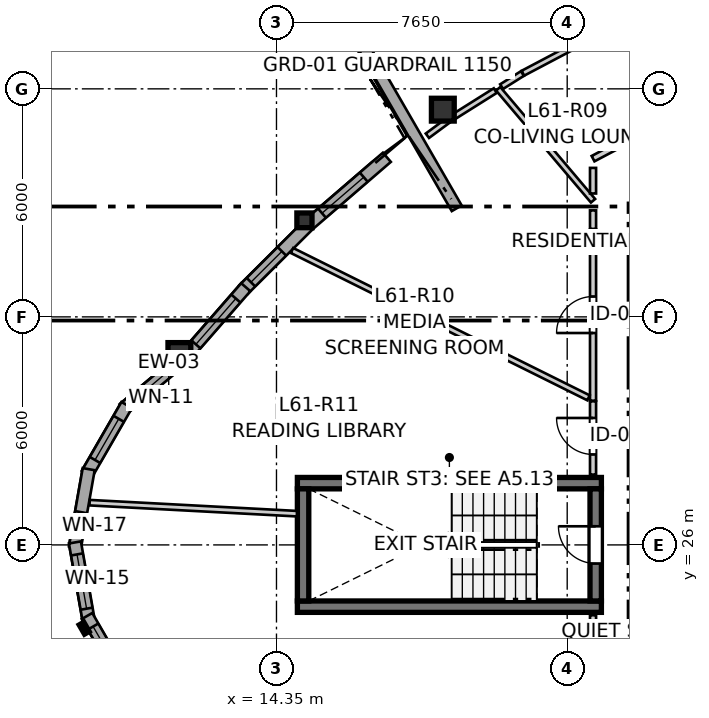
"""IFC4 building model, lengths in metres.
Left out: names, types, materials, properties, quantities, classifications, styles, units other than length and angle.
Written with IfcOpenShell. Run it as: python <this file> out.ifc"""

import sys

from ifc_helpers import new_model, si_unit, direction, frame, frame_2d, origin, origin_2d, place, context, subcontext, project, spatial, rectangle, i_section, extrude, source, transform, mapped, element, fill, save


model = new_model("IFC4")
c1 = context("Model", 3, precision=1e-05, world=origin(), true_north=direction((0.0, 1.0)))
c2 = subcontext(c1, "Body", "Model", "MODEL_VIEW")
j1 = project(units=[si_unit("LENGTHUNIT", "METRE"), si_unit("PLANEANGLEUNIT", "RADIAN")], contexts=[c1])
p1 = place(None, origin())
s1 = spatial("IfcSite", under=j1, at=p1, CompositionType="ELEMENT")
p2 = place(p1, origin())
s2 = spatial("IfcBuilding", under=s1, at=p2, CompositionType="ELEMENT")
p3 = place(p2, frame((0.0, 0.0, 205.2)))
s3 = spatial("IfcBuildingStorey", under=s2, at=p3, CompositionType="ELEMENT", Elevation=205.2)
for number, where, z_axis, x_axis in (
    (1, (14.9, 24.375, 0.0), (0.0, 0.0, 1.0), (1.0, 0.0, 0.0)),
    (2, (22.9, 27.625, 0.0), (0.0, 0.0, 1.0), (-1.0, 0.0, 0.0)),
):
    element("IfcWall", number, at=place(p3, frame(where, z_axis=z_axis, x_axis=x_axis)), inside=s3, PredefinedType="SHEAR", context=c2, shape_type="SweptSolid", body=[
        extrude(rectangle(XDim=8.0, YDim=0.3, at=frame_2d((4.0, 0.0))), origin(), (0.0, 0.0, 1.0), 2.935),
    ])
p4 = place(p3, frame((15.05, 27.475, 0.0), z_axis=(0.0, 0.0, 1.0), x_axis=(0.0, -1.0, 0.0)))
e3 = element("IfcWall", 3, at=p4, inside=s3, PredefinedType="SHEAR", context=c2, shape_type="SweptSolid", body=[
    extrude(rectangle(XDim=2.95, YDim=0.3, at=frame_2d((1.475, 0.0))), origin(), (0.0, 0.0, 1.0), 2.935),
])
p5 = place(p3, frame((22.75, 24.525, 0.0), z_axis=(0.0, 0.0, 1.0), x_axis=(0.0, 1.0, 0.0)))
e4 = element("IfcWall", 4, at=p5, inside=s3, PredefinedType="SHEAR", context=c2, shape_type="SweptSolid", body=[
    extrude(rectangle(XDim=2.95, YDim=0.3, at=frame_2d((1.475, 0.0))), origin(), (0.0, 0.0, 1.0), 2.935),
])
p6 = place(p5, frame((0.985, 0.0, 0.0)))
e5 = element("IfcOpeningElement", 5, at=p6, cuts=e4, PredefinedType="OPENING", context=c2, shape_type="SweptSolid", body=[
    extrude(rectangle(XDim=0.98, YDim=2.15, at=frame_2d((0.49, 1.075))), frame((0.0, 0.16, 0.0), z_axis=(0.0, -1.0, 0.0), x_axis=(1.0, 0.0, 0.0)), (0.0, 0.0, 1.0), 0.32),
])
m1 = source(origin(), c2, "Body", "SweptSolid", [
    extrude(rectangle(XDim=0.6, YDim=0.6, at=origin_2d()), origin(), (0.0, 0.0, 1.0), 2.935),
])
for number, where, z_axis, x_axis in (
    (6, (11.795, 31.023, 0.0), (0.0, 0.0, 1.0), (1.0, 0.0, 0.0)),
    (7, (18.727, 37.452, 0.0), (0.0, 0.0, 1.0), (1.0, 0.0, 0.0)),
):
    element("IfcColumn", number, at=place(p3, frame(where, z_axis=z_axis, x_axis=x_axis)), inside=s3, PredefinedType="COLUMN", context=c2, shape_type="MappedRepresentation", body=[
        mapped(m1, transform((0.0, 0.0, 0.0), x_axis=(1.0, 0.0, 0.0), y_axis=(0.0, 1.0, 0.0), z_axis=(0.0, 0.0, 1.0), scale=1.0)),
    ])
m2 = source(origin(), c2, "Body", "SweptSolid", [
    extrude(i_section(OverallWidth=0.398, OverallDepth=0.387, WebThickness=0.019, FlangeThickness=0.03, FilletRadius=0.015, at=origin_2d()), origin(), (0.0, 0.0, 1.0), 2.935),
])
p7 = place(p3, frame((15.086, 34.541, 0.0), z_axis=(0.0, 0.0, 1.0), x_axis=(1.0, 0.0, 0.0)))
e8 = element("IfcColumn", 8, at=p7, inside=s3, PredefinedType="PILASTER", context=c2, shape_type="MappedRepresentation", body=[
    mapped(m2, transform((0.0, 0.0, 0.0), x_axis=(1.0, 0.0, 0.0), y_axis=(0.0, 1.0, 0.0), z_axis=(0.0, 0.0, 1.0), scale=1.0)),
])
p8 = place(p3, frame((11.829, 30.843, 0.0), z_axis=(0.0, 0.0, 1.0), x_axis=(-0.76606505432, -0.642763045414, 0.0)))
e9 = element("IfcWall", 9, at=p8, inside=s3, PredefinedType="SOLIDWALL", context=c2, shape_type="SweptSolid", body=[
    extrude(rectangle(XDim=1.962, YDim=0.32, at=frame_2d((0.981, 0.0))), origin(), (0.0, 0.0, 1.0), 2.555),
])
p9 = place(p8, frame((0.391, 0.0, 0.82)))
e10 = element("IfcOpeningElement", 10, at=p9, cuts=e9, PredefinedType="OPENING", context=c2, shape_type="SweptSolid", body=[
    extrude(rectangle(XDim=1.25, YDim=1.35, at=frame_2d((0.625, 0.675))), frame((0.0, 0.17, 0.0), z_axis=(0.0, -1.0, 0.0), x_axis=(1.0, 0.0, 0.0)), (0.0, 0.0, 1.0), 0.34),
])
p10 = place(p3, frame((10.409, 29.681, 0.0), z_axis=(0.0, 0.0, 1.0), x_axis=(-0.49990781971, -0.866078617559, 0.0)))
e11 = element("IfcWall", 11, at=p10, inside=s3, PredefinedType="SOLIDWALL", context=c2, shape_type="SweptSolid", body=[
    extrude(rectangle(XDim=2.09, YDim=0.32, at=frame_2d((1.045, 0.0))), origin(), (0.0, 0.0, 1.0), 2.555),
])
p11 = place(p10, frame((0.42, 0.0, 0.82)))
e12 = element("IfcOpeningElement", 12, at=p11, cuts=e11, PredefinedType="OPENING", context=c2, shape_type="SweptSolid", body=[
    extrude(rectangle(XDim=1.25, YDim=1.35, at=frame_2d((0.625, 0.675))), frame((0.0, 0.17, 0.0), z_axis=(0.0, -1.0, 0.0), x_axis=(1.0, 0.0, 0.0)), (0.0, 0.0, 1.0), 0.34),
])
p12 = place(p3, frame((9.409, 27.993, 0.0), z_axis=(0.0, 0.0, 1.0), x_axis=(-0.173672066494, -0.984803540469, 0.0)))
e13 = element("IfcWall", 13, at=p12, inside=s3, PredefinedType="SOLIDWALL", context=c2, shape_type="SweptSolid", body=[
    extrude(rectangle(XDim=2.09, YDim=0.32, at=frame_2d((1.045, 0.0))), origin(), (0.0, 0.0, 1.0), 2.555),
])
p13 = place(p12, frame((1.149, 0.0, 0.82)))
e14 = element("IfcOpeningElement", 14, at=p13, cuts=e13, PredefinedType="OPENING", context=c2, shape_type="SweptSolid", body=[
    extrude(rectangle(XDim=0.58, YDim=1.35, at=frame_2d((0.29, 0.675))), frame((0.0, 0.17, 0.0), z_axis=(0.0, -1.0, 0.0), x_axis=(1.0, 0.0, 0.0)), (0.0, 0.0, 1.0), 0.34),
])
p14 = place(p3, frame((9.046, 26.065, 0.0), z_axis=(0.0, 0.0, 1.0), x_axis=(0.173672066494, -0.984803540469, 0.0)))
e15 = element("IfcWall", 15, at=p14, inside=s3, PredefinedType="SOLIDWALL", context=c2, shape_type="SweptSolid", body=[
    extrude(rectangle(XDim=2.09, YDim=0.32, at=frame_2d((1.045, 0.0))), origin(), (0.0, 0.0, 1.0), 2.555),
])
p15 = place(p14, frame((0.32, 0.0, 0.82)))
e16 = element("IfcOpeningElement", 16, at=p15, cuts=e15, PredefinedType="OPENING", context=c2, shape_type="SweptSolid", body=[
    extrude(rectangle(XDim=1.45, YDim=1.25, at=frame_2d((0.725, 0.625))), frame((0.0, 0.17, 0.0), z_axis=(0.0, -1.0, 0.0), x_axis=(1.0, 0.0, 0.0)), (0.0, 0.0, 1.0), 0.34),
])
p16 = place(p3, frame((9.365, 24.129, 0.0), z_axis=(0.0, 0.0, 1.0), x_axis=(0.49990781971, -0.866078617559, 0.0)))
e17 = element("IfcWall", 17, at=p16, inside=s3, PredefinedType="SOLIDWALL", context=c2, shape_type="SweptSolid", body=[
    extrude(rectangle(XDim=2.09, YDim=0.32, at=frame_2d((1.045, 0.0))), origin(), (0.0, 0.0, 1.0), 2.555),
])
p17 = place(p16, frame((0.32, 0.0, 0.82)))
e18 = element("IfcOpeningElement", 18, at=p17, cuts=e17, PredefinedType="OPENING", context=c2, shape_type="SweptSolid", body=[
    extrude(rectangle(XDim=1.45, YDim=1.25, at=frame_2d((0.725, 0.625))), frame((0.0, 0.17, 0.0), z_axis=(0.0, -1.0, 0.0), x_axis=(1.0, 0.0, 0.0)), (0.0, 0.0, 1.0), 0.34),
])
p18 = place(p3, frame((17.255, 36.199, 0.0), z_axis=(0.0, 0.0, 1.0), x_axis=(-0.757502279287, -0.652832518242, 0.0)))
e19 = element("IfcWall", 19, at=p18, inside=s3, PredefinedType="SOLIDWALL", context=c2, shape_type="SweptSolid", body=[
    extrude(rectangle(XDim=2.706, YDim=0.32, at=frame_2d((1.353, 0.0))), origin(), (0.0, 0.0, 1.0), 2.555),
])
p19 = place(p18, frame((0.803, 0.0, 0.82)))
e20 = element("IfcOpeningElement", 20, at=p19, cuts=e19, PredefinedType="OPENING", context=c2, shape_type="SweptSolid", body=[
    extrude(rectangle(XDim=1.45, YDim=1.25, at=frame_2d((0.725, 0.625))), frame((0.0, 0.17, 0.0), z_axis=(0.0, -1.0, 0.0), x_axis=(1.0, 0.0, 0.0)), (0.0, 0.0, 1.0), 0.34),
])
p20 = place(p3, frame((15.185, 34.413, 0.0), z_axis=(0.0, 0.0, 1.0), x_axis=(-0.70842648029, -0.705784614471, 0.0)))
e21 = element("IfcWall", 21, at=p20, inside=s3, PredefinedType="SOLIDWALL", context=c2, shape_type="SweptSolid", body=[
    extrude(rectangle(XDim=2.403, YDim=0.32, at=frame_2d((1.201, 0.0))), origin(), (0.0, 0.0, 1.0), 2.555),
])
p21 = place(p20, frame((0.976, 0.0, 0.82)))
e22 = element("IfcOpeningElement", 22, at=p21, cuts=e21, PredefinedType="OPENING", context=c2, shape_type="SweptSolid", body=[
    extrude(rectangle(XDim=1.15, YDim=1.2, at=frame_2d((0.575, 0.6))), frame((0.0, 0.17, 0.0), z_axis=(0.0, -1.0, 0.0), x_axis=(1.0, 0.0, 0.0)), (0.0, 0.0, 1.0), 0.34),
])
p22 = place(p3, frame((13.542, 32.781, 0.0), z_axis=(0.0, 0.0, 1.0), x_axis=(-0.657706548736, -0.753274250024, 0.0)))
e23 = element("IfcWall", 23, at=p22, inside=s3, PredefinedType="SOLIDWALL", context=c2, shape_type="SweptSolid", body=[
    extrude(rectangle(XDim=2.384, YDim=0.32, at=frame_2d((1.192, 0.0))), origin(), (0.0, 0.0, 1.0), 2.555),
])
p23 = place(p22, frame((0.397, 0.0, 0.82)))
e24 = element("IfcOpeningElement", 24, at=p23, cuts=e23, PredefinedType="OPENING", context=c2, shape_type="SweptSolid", body=[
    extrude(rectangle(XDim=1.6, YDim=1.35, at=frame_2d((0.8, 0.675))), frame((0.0, 0.17, 0.0), z_axis=(0.0, -1.0, 0.0), x_axis=(1.0, 0.0, 0.0)), (0.0, 0.0, 1.0), 0.34),
])
p24 = place(p3, frame((19.093, 34.858, 0.0), z_axis=(0.0, 0.0, 1.0), x_axis=(-0.499994279776, 0.866028706332, 0.0)))
e25 = element("IfcWall", 25, at=p24, inside=s3, PredefinedType="SOLIDWALL", context=c2, shape_type="SweptSolid", body=[
    extrude(rectangle(XDim=19.929, YDim=0.3, at=frame_2d((9.964, 0.0))), origin(), (0.0, 0.0, 1.0), 2.115),
])
p25 = place(p3, frame((22.68, 19.52, 0.0), z_axis=(0.0, 0.0, 1.0), x_axis=(0.0, 1.0, 0.0)))
e26 = element("IfcWall", 26, at=p25, inside=s3, PredefinedType="PARTITIONING", context=c2, shape_type="SweptSolid", body=[
    extrude(rectangle(XDim=4.63, YDim=0.16, at=frame_2d((2.315, 0.0))), origin(), (0.0, 0.0, 1.0), 2.935),
])
p26 = place(p25, frame((1.357, 0.0, 0.0)))
e27 = element("IfcOpeningElement", 27, at=p26, cuts=e26, PredefinedType="OPENING", context=c2, shape_type="SweptSolid", body=[
    extrude(rectangle(XDim=1.3, YDim=2.1, at=frame_2d((0.65, 1.05))), frame((0.0, 0.09, 0.0), z_axis=(0.0, -1.0, 0.0), x_axis=(1.0, 0.0, 0.0)), (0.0, 0.0, 1.0), 0.18),
])
p27 = place(p3, frame((22.68, 29.794, 0.0), z_axis=(0.0, 0.0, 1.0), x_axis=(0.0, 1.0, 0.0)))
e28 = element("IfcWall", 28, at=p27, inside=s3, PredefinedType="PARTITIONING", context=c2, shape_type="SweptSolid", body=[
    extrude(rectangle(XDim=4.506, YDim=0.16, at=frame_2d((2.253, 0.0))), origin(), (0.0, 0.0, 1.0), 2.935),
])
p28 = place(p27, frame((1.781, 0.0, 0.0)))
e29 = element("IfcOpeningElement", 29, at=p28, cuts=e28, PredefinedType="OPENING", context=c2, shape_type="SweptSolid", body=[
    extrude(rectangle(XDim=0.96, YDim=2.1, at=frame_2d((0.48, 1.05))), frame((0.0, 0.09, 0.0), z_axis=(0.0, -1.0, 0.0), x_axis=(1.0, 0.0, 0.0)), (0.0, 0.0, 1.0), 0.18),
])
p29 = place(p3, frame((22.68, 27.85, 0.0), z_axis=(0.0, 0.0, 1.0), x_axis=(0.0, 1.0, 0.0)))
e30 = element("IfcWall", 30, at=p29, inside=s3, PredefinedType="PARTITIONING", context=c2, shape_type="SweptSolid", body=[
    extrude(rectangle(XDim=1.929, YDim=0.16, at=frame_2d((0.964, 0.0))), origin(), (0.0, 0.0, 1.0), 2.935),
])
p30 = place(p29, frame((0.53, 0.0, 0.0)))
e31 = element("IfcOpeningElement", 31, at=p30, cuts=e30, PredefinedType="OPENING", context=c2, shape_type="SweptSolid", body=[
    extrude(rectangle(XDim=0.96, YDim=2.1, at=frame_2d((0.48, 1.05))), frame((0.0, 0.09, 0.0), z_axis=(0.0, -1.0, 0.0), x_axis=(1.0, 0.0, 0.0)), (0.0, 0.0, 1.0), 0.18),
])
p31 = place(p3, frame((14.759, 33.747, 0.0), z_axis=(0.0, 0.0, 1.0), x_axis=(0.895550902793, -0.44495907734, 0.0)))
e32 = element("IfcWall", 32, at=p31, inside=s3, PredefinedType="PARTITIONING", context=c2, shape_type="SweptSolid", body=[
    extrude(rectangle(XDim=8.712, YDim=0.145, at=frame_2d((4.356, 0.0))), origin(), (0.0, 0.0, 1.0), 2.935),
])
p32 = place(p3, frame((9.433, 27.112, 0.0), z_axis=(0.0, 0.0, 1.0), x_axis=(0.998589537807, -0.053093643525, 0.0)))
e33 = element("IfcWall", 33, at=p32, inside=s3, PredefinedType="PARTITIONING", context=c2, shape_type="SweptSolid", body=[
    extrude(rectangle(XDim=5.463, YDim=0.145, at=frame_2d((2.731, 0.0))), origin(), (0.0, 0.0, 1.0), 2.935),
])
p33 = place(p3, frame((20.184, 38.002, 0.0), z_axis=(0.0, 0.0, 1.0), x_axis=(0.646276580378, -0.763103257531, 0.0)))
e34 = element("IfcWall", 34, at=p33, inside=s3, PredefinedType="PARTITIONING", context=c2, shape_type="SweptSolid", body=[
    extrude(rectangle(XDim=3.862, YDim=0.145, at=frame_2d((1.931, 0.0))), origin(), (0.0, 0.0, 1.0), 2.935),
])
p34 = place(p3, frame((20.834, 38.411, 0.0), z_axis=(0.0, 0.0, 1.0), x_axis=(0.884282286127, 0.466952715425, 0.0)))
e35 = element("IfcWall", 35, at=p34, inside=s3, PredefinedType="PARTITIONING", context=c2, shape_type="SweptSolid", body=[
    extrude(rectangle(XDim=2.268, YDim=0.145, at=frame_2d((1.134, 0.0))), origin(), (0.0, 0.0, 1.0), 2.543),
])
p35 = place(p3, frame((22.68, 36.163, 0.0), z_axis=(0.0, 0.0, 1.0), x_axis=(0.884428711586, 0.466675319812, 0.0)))
e36 = element("IfcWall", 36, at=p35, inside=s3, PredefinedType="PARTITIONING", context=c2, shape_type="SweptSolid", body=[
    extrude(rectangle(XDim=1.592, YDim=0.16, at=frame_2d((0.796, 0.0))), origin(), (0.0, 0.0, 1.0), 2.935),
])
p36 = place(p3, frame((18.902, 37.196, 0.0), z_axis=(0.0, 0.0, 1.0), x_axis=(0.846539334405, 0.532326173794, 0.0)))
e37 = element("IfcWall", 37, at=p36, inside=s3, PredefinedType="PARTITIONING", context=c2, shape_type="SweptSolid", body=[
    extrude(rectangle(XDim=1.423, YDim=0.145, at=frame_2d((0.711, 0.0))), origin(), (0.0, 0.0, 1.0), 2.543),
])
p37 = place(p3, frame((22.68, 35.247, 0.0), z_axis=(0.0, 0.0, 1.0), x_axis=(0.0, 1.0, 0.0)))
e38 = element("IfcWall", 38, at=p37, inside=s3, PredefinedType="PARTITIONING", context=c2, shape_type="SweptSolid", body=[
    extrude(rectangle(XDim=0.673, YDim=0.16, at=frame_2d((0.337, 0.0))), origin(), (0.0, 0.0, 1.0), 2.935),
])
p38 = place(p3, frame((20.274, 38.059, 0.0), z_axis=(0.0, 0.0, 1.0), x_axis=(0.84623284009, 0.532813269686, 0.0)))
e39 = element("IfcWall", 39, at=p38, inside=s3, PredefinedType="PARTITIONING", context=c2, shape_type="SweptSolid", body=[
    extrude(rectangle(XDim=0.646, YDim=0.145, at=frame_2d((0.323, 0.0))), origin(), (0.0, 0.0, 1.0), 2.543),
])
p39 = place(p3, frame((18.321, 36.766, 0.0), z_axis=(0.0, 0.0, 1.0), x_axis=(0.80387489201, 0.594798417951, 0.0)))
e40 = element("IfcWall", 40, at=p39, inside=s3, PredefinedType="PARTITIONING", context=c2, shape_type="SweptSolid", body=[
    extrude(rectangle(XDim=0.708, YDim=0.145, at=frame_2d((0.354, 0.0))), origin(), (0.0, 0.0, 1.0), 2.543),
])
p40 = place(p3, frame((22.68, 34.315, 0.0), z_axis=(0.0, 0.0, 1.0), x_axis=(0.0, 1.0, 0.0)))
e41 = element("IfcWall", 41, at=p40, inside=s3, PredefinedType="PARTITIONING", context=c2, shape_type="SweptSolid", body=[
    extrude(rectangle(XDim=0.488, YDim=0.16, at=frame_2d((0.244, 0.0))), origin(), (0.0, 0.0, 1.0), 2.935),
])
m3 = source(origin(), c2, "Body", "SweptSolid", [
    extrude(rectangle(XDim=1.25, YDim=1.35, at=frame_2d((0.625, 0.675))), frame((0.0, 0.03, 0.0), z_axis=(0.0, -1.0, 0.0), x_axis=(1.0, 0.0, 0.0)), (0.0, 0.0, 1.0), 0.06),
])
p41 = place(p9, origin())
e42 = element("IfcWindow", 42, at=p41, inside=s3, PartitioningType="SINGLE_PANEL", PredefinedType="WINDOW", context=c2, shape_type="MappedRepresentation", body=[
    mapped(m3, transform((0.0, 0.0, 0.0), x_axis=(1.0, 0.0, 0.0), y_axis=(0.0, 1.0, 0.0), z_axis=(0.0, 0.0, 1.0), scale=1.0)),
])
fill(e10, e42)
p42 = place(p11, origin())
e43 = element("IfcWindow", 43, at=p42, inside=s3, PartitioningType="SINGLE_PANEL", PredefinedType="WINDOW", context=c2, shape_type="MappedRepresentation", body=[
    mapped(m3, transform((0.0, 0.0, 0.0), x_axis=(1.0, 0.0, 0.0), y_axis=(0.0, 1.0, 0.0), z_axis=(0.0, 0.0, 1.0), scale=1.0)),
])
fill(e12, e43)
m4 = source(origin(), c2, "Body", "SweptSolid", [
    extrude(rectangle(XDim=0.58, YDim=1.35, at=frame_2d((0.29, 0.675))), frame((0.0, 0.03, 0.0), z_axis=(0.0, -1.0, 0.0), x_axis=(1.0, 0.0, 0.0)), (0.0, 0.0, 1.0), 0.06),
])
p43 = place(p13, origin())
e44 = element("IfcWindow", 44, at=p43, inside=s3, PartitioningType="SINGLE_PANEL", PredefinedType="WINDOW", context=c2, shape_type="MappedRepresentation", body=[
    mapped(m4, transform((0.0, 0.0, 0.0), x_axis=(1.0, 0.0, 0.0), y_axis=(0.0, 1.0, 0.0), z_axis=(0.0, 0.0, 1.0), scale=1.0)),
])
fill(e14, e44)
m5 = source(origin(), c2, "Body", "SweptSolid", [
    extrude(rectangle(XDim=1.45, YDim=1.25, at=frame_2d((0.725, 0.625))), frame((0.0, 0.03, 0.0), z_axis=(0.0, -1.0, 0.0), x_axis=(1.0, 0.0, 0.0)), (0.0, 0.0, 1.0), 0.06),
])
p44 = place(p15, origin())
e45 = element("IfcWindow", 45, at=p44, inside=s3, PartitioningType="SINGLE_PANEL", PredefinedType="WINDOW", context=c2, shape_type="MappedRepresentation", body=[
    mapped(m5, transform((0.0, 0.0, 0.0), x_axis=(1.0, 0.0, 0.0), y_axis=(0.0, 1.0, 0.0), z_axis=(0.0, 0.0, 1.0), scale=1.0)),
])
fill(e16, e45)
p45 = place(p17, origin())
e46 = element("IfcWindow", 46, at=p45, inside=s3, PartitioningType="SINGLE_PANEL", PredefinedType="WINDOW", context=c2, shape_type="MappedRepresentation", body=[
    mapped(m5, transform((0.0, 0.0, 0.0), x_axis=(1.0, 0.0, 0.0), y_axis=(0.0, 1.0, 0.0), z_axis=(0.0, 0.0, 1.0), scale=1.0)),
])
fill(e18, e46)
p46 = place(p19, origin())
e47 = element("IfcWindow", 47, at=p46, inside=s3, PartitioningType="SINGLE_PANEL", PredefinedType="WINDOW", context=c2, shape_type="MappedRepresentation", body=[
    mapped(m5, transform((0.0, 0.0, 0.0), x_axis=(1.0, 0.0, 0.0), y_axis=(0.0, 1.0, 0.0), z_axis=(0.0, 0.0, 1.0), scale=1.0)),
])
fill(e20, e47)
m6 = source(origin(), c2, "Body", "SweptSolid", [
    extrude(rectangle(XDim=1.15, YDim=1.2, at=frame_2d((0.575, 0.6))), frame((0.0, 0.03, 0.0), z_axis=(0.0, -1.0, 0.0), x_axis=(1.0, 0.0, 0.0)), (0.0, 0.0, 1.0), 0.06),
])
p47 = place(p21, origin())
e48 = element("IfcWindow", 48, at=p47, inside=s3, PartitioningType="SINGLE_PANEL", PredefinedType="WINDOW", context=c2, shape_type="MappedRepresentation", body=[
    mapped(m6, transform((0.0, 0.0, 0.0), x_axis=(1.0, 0.0, 0.0), y_axis=(0.0, 1.0, 0.0), z_axis=(0.0, 0.0, 1.0), scale=1.0)),
])
fill(e22, e48)
m7 = source(origin(), c2, "Body", "SweptSolid", [
    extrude(rectangle(XDim=1.6, YDim=1.35, at=frame_2d((0.8, 0.675))), frame((0.0, 0.03, 0.0), z_axis=(0.0, -1.0, 0.0), x_axis=(1.0, 0.0, 0.0)), (0.0, 0.0, 1.0), 0.06),
])
p48 = place(p23, origin())
e49 = element("IfcWindow", 49, at=p48, inside=s3, PartitioningType="SINGLE_PANEL", PredefinedType="WINDOW", context=c2, shape_type="MappedRepresentation", body=[
    mapped(m7, transform((0.0, 0.0, 0.0), x_axis=(1.0, 0.0, 0.0), y_axis=(0.0, 1.0, 0.0), z_axis=(0.0, 0.0, 1.0), scale=1.0)),
])
fill(e24, e49)
m8 = source(origin(), c2, "Body", "SweptSolid", [
    extrude(rectangle(XDim=0.98, YDim=2.15, at=frame_2d((0.49, 1.075))), frame((0.0, 0.025, 0.0), z_axis=(0.0, -1.0, 0.0), x_axis=(1.0, 0.0, 0.0)), (0.0, 0.0, 1.0), 0.05),
])
p49 = place(p6, origin())
e50 = element("IfcDoor", 50, at=p49, inside=s3, OperationType="SINGLE_SWING_RIGHT", PredefinedType="DOOR", context=c2, shape_type="MappedRepresentation", body=[
    mapped(m8, transform((0.0, 0.0, 0.0), x_axis=(1.0, 0.0, 0.0), y_axis=(0.0, 1.0, 0.0), z_axis=(0.0, 0.0, 1.0), scale=1.0)),
])
fill(e5, e50)
m9 = source(origin(), c2, "Body", "SweptSolid", [
    extrude(rectangle(XDim=0.96, YDim=2.1, at=frame_2d((0.48, 1.05))), frame((0.0, 0.025, 0.0), z_axis=(0.0, -1.0, 0.0), x_axis=(1.0, 0.0, 0.0)), (0.0, 0.0, 1.0), 0.05),
])
p50 = place(p28, origin())
e51 = element("IfcDoor", 51, at=p50, inside=s3, OperationType="SINGLE_SWING_LEFT", PredefinedType="DOOR", context=c2, shape_type="MappedRepresentation", body=[
    mapped(m9, transform((0.0, 0.0, 0.0), x_axis=(1.0, 0.0, 0.0), y_axis=(0.0, 1.0, 0.0), z_axis=(0.0, 0.0, 1.0), scale=1.0)),
])
fill(e29, e51)
p51 = place(p30, origin())
e52 = element("IfcDoor", 52, at=p51, inside=s3, OperationType="SINGLE_SWING_RIGHT", PredefinedType="DOOR", context=c2, shape_type="MappedRepresentation", body=[
    mapped(m9, transform((0.0, 0.0, 0.0), x_axis=(1.0, 0.0, 0.0), y_axis=(0.0, 1.0, 0.0), z_axis=(0.0, 0.0, 1.0), scale=1.0)),
])
fill(e31, e52)
save(model, sys.argv[1])
